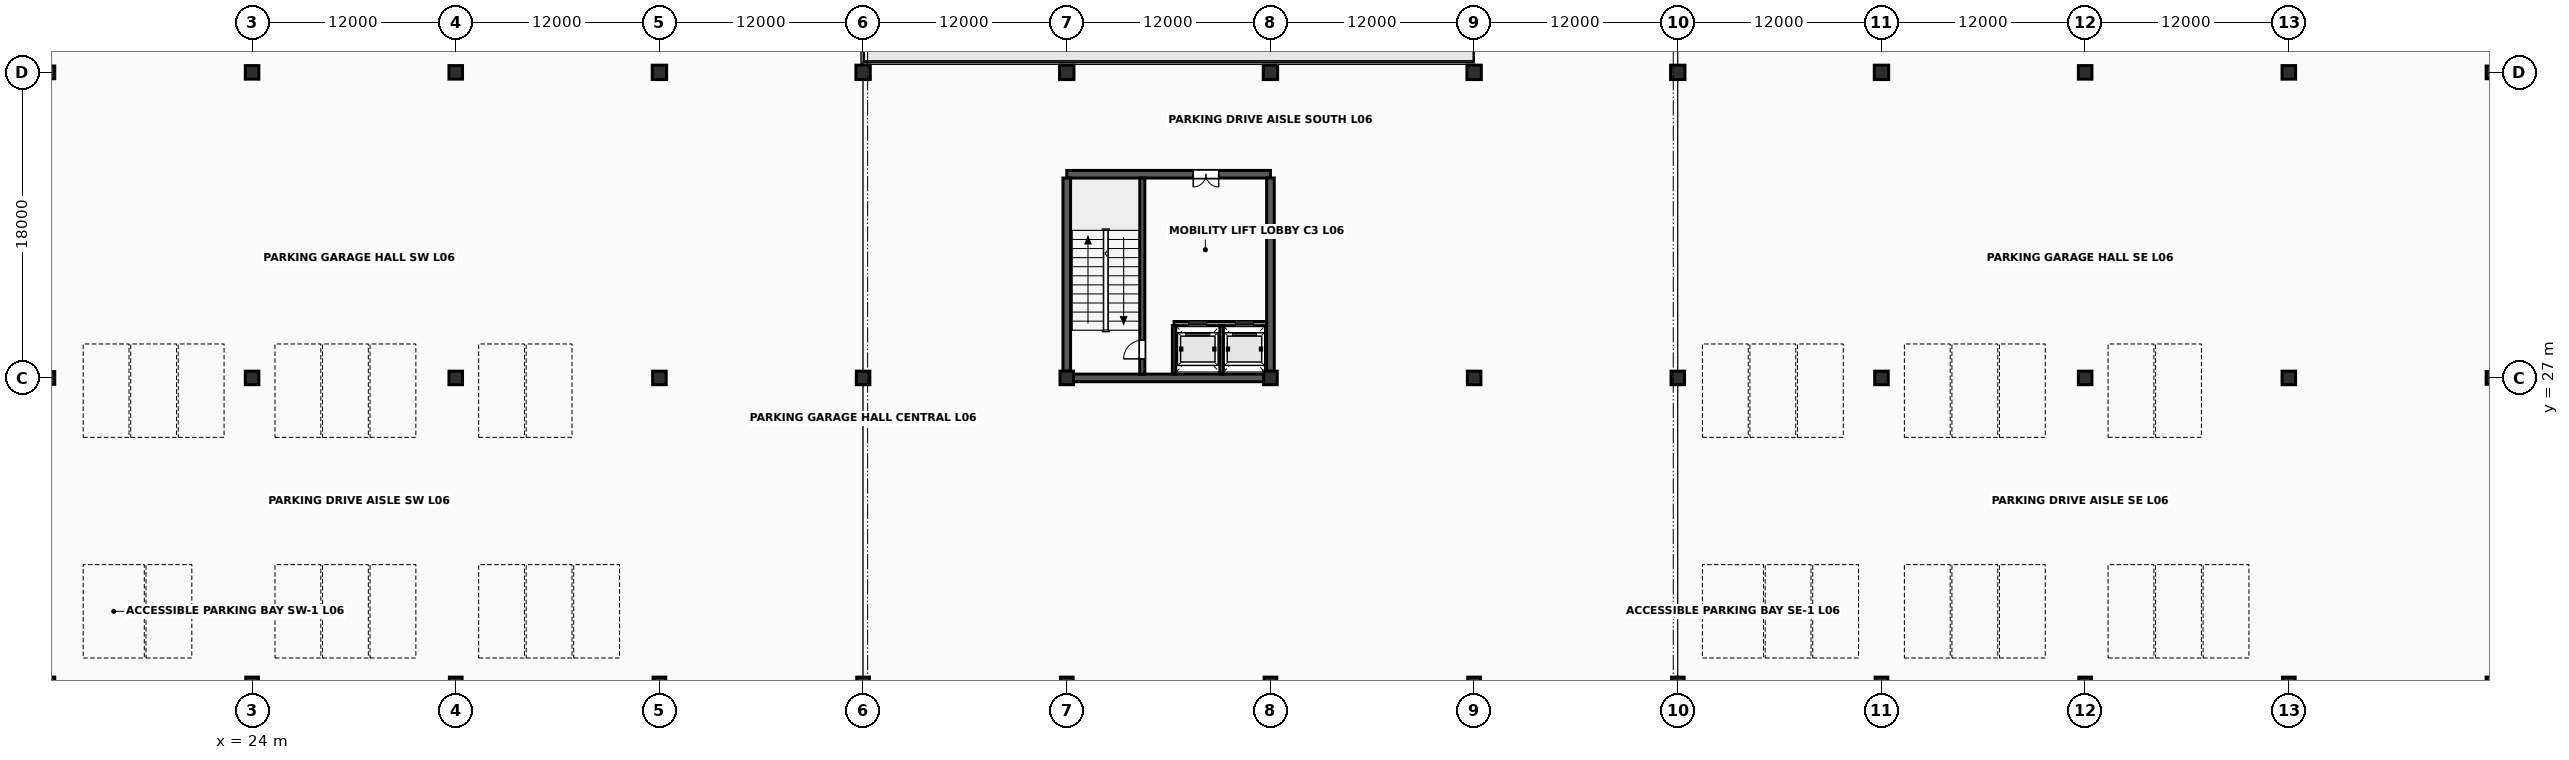
"""IFC4 building model, lengths in metres.
Left out: names, types, materials, properties, quantities, classifications, styles, units other than length and angle.
Written with IfcOpenShell. Run it as: python <this file> out.ifc"""

import sys

from ifc_helpers import new_model, si_unit, direction, frame, frame_2d, origin, origin_2d, place, context, subcontext, project, spatial, rectangle, extrude, element, fill, save


model = new_model("IFC4")
c1 = context("Model", 3, precision=1e-05, world=origin(), true_north=direction((0.0, 1.0)))
c2 = subcontext(c1, "Body", "Model", "MODEL_VIEW")
j1 = project(units=[si_unit("LENGTHUNIT", "METRE"), si_unit("PLANEANGLEUNIT", "RADIAN")], contexts=[c1])
p1 = place(None, origin())
s1 = spatial("IfcSite", under=j1, at=p1, CompositionType="ELEMENT")
p2 = place(p1, origin())
s2 = spatial("IfcBuilding", under=s1, at=p2, CompositionType="ELEMENT")
p3 = place(p2, frame((0.0, 0.0, 24.8)))
s3 = spatial("IfcBuildingStorey", under=s2, at=p3, CompositionType="ELEMENT", Elevation=24.8)
for number, where, z_axis, x_axis in (
    (1, (12.0, 9.0, 0.0), (0.0, 0.0, 1.0), (1.0, 0.0, 0.0)),
    (2, (12.0, 27.0, 0.0), (0.0, 0.0, 1.0), (1.0, 0.0, 0.0)),
    (3, (12.0, 45.0, 0.0), (0.0, 0.0, 1.0), (1.0, 0.0, 0.0)),
    (4, (24.0, 9.0, 0.0), (0.0, 0.0, 1.0), (1.0, 0.0, 0.0)),
):
    element("IfcColumn", number, at=place(p3, frame(where, z_axis=z_axis, x_axis=x_axis)), inside=s3, PredefinedType="COLUMN", context=c2, shape_type="SweptSolid", body=[
        extrude(rectangle(XDim=0.75, YDim=0.75, at=origin_2d()), origin(), (0.0, 0.0, 1.0), 3.8),
    ])
for number, where, z_axis, x_axis in (
    (5, (24.0, 27.0, 0.0), (0.0, 0.0, 1.0), (1.0, 0.0, 0.0)),
    (6, (24.0, 45.0, 0.0), (0.0, 0.0, 1.0), (1.0, 0.0, 0.0)),
):
    element("IfcColumn", number, at=place(p3, frame(where, z_axis=z_axis, x_axis=x_axis)), inside=s3, PredefinedType="COLUMN", context=c2, shape_type="SweptSolid", body=[
        extrude(rectangle(XDim=0.8, YDim=0.8, at=origin_2d()), origin(), (0.0, 0.0, 1.0), 3.8),
    ])
p4 = place(p3, frame((36.0, 9.0, 0.0), z_axis=(0.0, 0.0, 1.0), x_axis=(1.0, 0.0, 0.0)))
e7 = element("IfcColumn", 7, at=p4, inside=s3, PredefinedType="COLUMN", context=c2, shape_type="SweptSolid", body=[
    extrude(rectangle(XDim=0.75, YDim=0.75, at=origin_2d()), origin(), (0.0, 0.0, 1.0), 3.8),
])
for number, where, z_axis, x_axis in (
    (8, (36.0, 27.0, 0.0), (0.0, 0.0, 1.0), (1.0, 0.0, 0.0)),
    (9, (36.0, 45.0, 0.0), (0.0, 0.0, 1.0), (1.0, 0.0, 0.0)),
):
    element("IfcColumn", number, at=place(p3, frame(where, z_axis=z_axis, x_axis=x_axis)), inside=s3, PredefinedType="COLUMN", context=c2, shape_type="SweptSolid", body=[
        extrude(rectangle(XDim=0.8, YDim=0.8, at=origin_2d()), origin(), (0.0, 0.0, 1.0), 3.8),
    ])
p5 = place(p3, frame((48.0, 9.0, 0.0), z_axis=(0.0, 0.0, 1.0), x_axis=(1.0, 0.0, 0.0)))
e10 = element("IfcColumn", 10, at=p5, inside=s3, PredefinedType="COLUMN", context=c2, shape_type="SweptSolid", body=[
    extrude(rectangle(XDim=0.75, YDim=0.75, at=origin_2d()), origin(), (0.0, 0.0, 1.0), 3.8),
])
p6 = place(p3, frame((48.0, 27.0, 0.0), z_axis=(0.0, 0.0, 1.0), x_axis=(1.0, 0.0, 0.0)))
e11 = element("IfcColumn", 11, at=p6, inside=s3, PredefinedType="COLUMN", context=c2, shape_type="SweptSolid", body=[
    extrude(rectangle(XDim=0.8, YDim=0.8, at=origin_2d()), origin(), (0.0, 0.0, 1.0), 3.8),
])
p7 = place(p3, frame((48.0, 45.0, 0.0), z_axis=(0.0, 0.0, 1.0), x_axis=(1.0, 0.0, 0.0)))
e12 = element("IfcColumn", 12, at=p7, inside=s3, PredefinedType="COLUMN", context=c2, shape_type="SweptSolid", body=[
    extrude(rectangle(XDim=0.85, YDim=0.85, at=origin_2d()), origin(), (0.0, 0.0, 1.0), 3.8),
])
p8 = place(p3, frame((60.0, 9.0, 0.0), z_axis=(0.0, 0.0, 1.0), x_axis=(1.0, 0.0, 0.0)))
e13 = element("IfcColumn", 13, at=p8, inside=s3, PredefinedType="COLUMN", context=c2, shape_type="SweptSolid", body=[
    extrude(rectangle(XDim=0.75, YDim=0.75, at=origin_2d()), origin(), (0.0, 0.0, 1.0), 3.8),
])
p9 = place(p3, frame((60.0, 27.0, 0.0), z_axis=(0.0, 0.0, 1.0), x_axis=(1.0, 0.0, 0.0)))
e14 = element("IfcColumn", 14, at=p9, inside=s3, PredefinedType="COLUMN", context=c2, shape_type="SweptSolid", body=[
    extrude(rectangle(XDim=0.8, YDim=0.8, at=origin_2d()), origin(), (0.0, 0.0, 1.0), 3.8),
])
p10 = place(p3, frame((60.0, 45.0, 0.0), z_axis=(0.0, 0.0, 1.0), x_axis=(1.0, 0.0, 0.0)))
e15 = element("IfcColumn", 15, at=p10, inside=s3, PredefinedType="COLUMN", context=c2, shape_type="SweptSolid", body=[
    extrude(rectangle(XDim=0.85, YDim=0.85, at=origin_2d()), origin(), (0.0, 0.0, 1.0), 3.8),
])
p11 = place(p3, frame((72.0, 9.0, 0.0), z_axis=(0.0, 0.0, 1.0), x_axis=(1.0, 0.0, 0.0)))
e16 = element("IfcColumn", 16, at=p11, inside=s3, PredefinedType="COLUMN", context=c2, shape_type="SweptSolid", body=[
    extrude(rectangle(XDim=0.75, YDim=0.75, at=origin_2d()), origin(), (0.0, 0.0, 1.0), 3.8),
])
p12 = place(p3, frame((72.0, 27.0, 0.0), z_axis=(0.0, 0.0, 1.0), x_axis=(1.0, 0.0, 0.0)))
e17 = element("IfcColumn", 17, at=p12, inside=s3, PredefinedType="COLUMN", context=c2, shape_type="SweptSolid", body=[
    extrude(rectangle(XDim=0.8, YDim=0.8, at=origin_2d()), origin(), (0.0, 0.0, 1.0), 3.8),
])
p13 = place(p3, frame((72.0, 45.0, 0.0), z_axis=(0.0, 0.0, 1.0), x_axis=(1.0, 0.0, 0.0)))
e18 = element("IfcColumn", 18, at=p13, inside=s3, PredefinedType="COLUMN", context=c2, shape_type="SweptSolid", body=[
    extrude(rectangle(XDim=0.85, YDim=0.85, at=origin_2d()), origin(), (0.0, 0.0, 1.0), 3.8),
])
p14 = place(p3, frame((84.0, 9.0, 0.0), z_axis=(0.0, 0.0, 1.0), x_axis=(1.0, 0.0, 0.0)))
e19 = element("IfcColumn", 19, at=p14, inside=s3, PredefinedType="COLUMN", context=c2, shape_type="SweptSolid", body=[
    extrude(rectangle(XDim=0.75, YDim=0.75, at=origin_2d()), origin(), (0.0, 0.0, 1.0), 3.8),
])
p15 = place(p3, frame((84.0, 27.0, 0.0), z_axis=(0.0, 0.0, 1.0), x_axis=(1.0, 0.0, 0.0)))
e20 = element("IfcColumn", 20, at=p15, inside=s3, PredefinedType="COLUMN", context=c2, shape_type="SweptSolid", body=[
    extrude(rectangle(XDim=0.8, YDim=0.8, at=origin_2d()), origin(), (0.0, 0.0, 1.0), 3.8),
])
p16 = place(p3, frame((84.0, 45.0, 0.0), z_axis=(0.0, 0.0, 1.0), x_axis=(1.0, 0.0, 0.0)))
e21 = element("IfcColumn", 21, at=p16, inside=s3, PredefinedType="COLUMN", context=c2, shape_type="SweptSolid", body=[
    extrude(rectangle(XDim=0.85, YDim=0.85, at=origin_2d()), origin(), (0.0, 0.0, 1.0), 3.8),
])
p17 = place(p3, frame((96.0, 9.0, 0.0), z_axis=(0.0, 0.0, 1.0), x_axis=(1.0, 0.0, 0.0)))
e22 = element("IfcColumn", 22, at=p17, inside=s3, PredefinedType="COLUMN", context=c2, shape_type="SweptSolid", body=[
    extrude(rectangle(XDim=0.75, YDim=0.75, at=origin_2d()), origin(), (0.0, 0.0, 1.0), 3.8),
])
p18 = place(p3, frame((96.0, 27.0, 0.0), z_axis=(0.0, 0.0, 1.0), x_axis=(1.0, 0.0, 0.0)))
e23 = element("IfcColumn", 23, at=p18, inside=s3, PredefinedType="COLUMN", context=c2, shape_type="SweptSolid", body=[
    extrude(rectangle(XDim=0.8, YDim=0.8, at=origin_2d()), origin(), (0.0, 0.0, 1.0), 3.8),
])
p19 = place(p3, frame((96.0, 45.0, 0.0), z_axis=(0.0, 0.0, 1.0), x_axis=(1.0, 0.0, 0.0)))
e24 = element("IfcColumn", 24, at=p19, inside=s3, PredefinedType="COLUMN", context=c2, shape_type="SweptSolid", body=[
    extrude(rectangle(XDim=0.85, YDim=0.85, at=origin_2d()), origin(), (0.0, 0.0, 1.0), 3.8),
])
p20 = place(p3, frame((108.0, 9.0, 0.0), z_axis=(0.0, 0.0, 1.0), x_axis=(1.0, 0.0, 0.0)))
e25 = element("IfcColumn", 25, at=p20, inside=s3, PredefinedType="COLUMN", context=c2, shape_type="SweptSolid", body=[
    extrude(rectangle(XDim=0.75, YDim=0.75, at=origin_2d()), origin(), (0.0, 0.0, 1.0), 3.8),
])
p21 = place(p3, frame((108.0, 27.0, 0.0), z_axis=(0.0, 0.0, 1.0), x_axis=(1.0, 0.0, 0.0)))
e26 = element("IfcColumn", 26, at=p21, inside=s3, PredefinedType="COLUMN", context=c2, shape_type="SweptSolid", body=[
    extrude(rectangle(XDim=0.8, YDim=0.8, at=origin_2d()), origin(), (0.0, 0.0, 1.0), 3.8),
])
p22 = place(p3, frame((108.0, 45.0, 0.0), z_axis=(0.0, 0.0, 1.0), x_axis=(1.0, 0.0, 0.0)))
e27 = element("IfcColumn", 27, at=p22, inside=s3, PredefinedType="COLUMN", context=c2, shape_type="SweptSolid", body=[
    extrude(rectangle(XDim=0.85, YDim=0.85, at=origin_2d()), origin(), (0.0, 0.0, 1.0), 3.8),
])
p23 = place(p3, frame((120.0, 9.0, 0.0), z_axis=(0.0, 0.0, 1.0), x_axis=(1.0, 0.0, 0.0)))
e28 = element("IfcColumn", 28, at=p23, inside=s3, PredefinedType="COLUMN", context=c2, shape_type="SweptSolid", body=[
    extrude(rectangle(XDim=0.75, YDim=0.75, at=origin_2d()), origin(), (0.0, 0.0, 1.0), 3.8),
])
p24 = place(p3, frame((120.0, 27.0, 0.0), z_axis=(0.0, 0.0, 1.0), x_axis=(1.0, 0.0, 0.0)))
e29 = element("IfcColumn", 29, at=p24, inside=s3, PredefinedType="COLUMN", context=c2, shape_type="SweptSolid", body=[
    extrude(rectangle(XDim=0.8, YDim=0.8, at=origin_2d()), origin(), (0.0, 0.0, 1.0), 3.8),
])
p25 = place(p3, frame((120.0, 45.0, 0.0), z_axis=(0.0, 0.0, 1.0), x_axis=(1.0, 0.0, 0.0)))
e30 = element("IfcColumn", 30, at=p25, inside=s3, PredefinedType="COLUMN", context=c2, shape_type="SweptSolid", body=[
    extrude(rectangle(XDim=0.85, YDim=0.85, at=origin_2d()), origin(), (0.0, 0.0, 1.0), 3.8),
])
p26 = place(p3, frame((132.0, 9.0, 0.0), z_axis=(0.0, 0.0, 1.0), x_axis=(1.0, 0.0, 0.0)))
e31 = element("IfcColumn", 31, at=p26, inside=s3, PredefinedType="COLUMN", context=c2, shape_type="SweptSolid", body=[
    extrude(rectangle(XDim=0.75, YDim=0.75, at=origin_2d()), origin(), (0.0, 0.0, 1.0), 3.8),
])
for number, where, z_axis, x_axis in (
    (32, (132.0, 27.0, 0.0), (0.0, 0.0, 1.0), (1.0, 0.0, 0.0)),
    (33, (132.0, 45.0, 0.0), (0.0, 0.0, 1.0), (1.0, 0.0, 0.0)),
):
    element("IfcColumn", number, at=place(p3, frame(where, z_axis=z_axis, x_axis=x_axis)), inside=s3, PredefinedType="COLUMN", context=c2, shape_type="SweptSolid", body=[
        extrude(rectangle(XDim=0.8, YDim=0.8, at=origin_2d()), origin(), (0.0, 0.0, 1.0), 3.8),
    ])
p27 = place(p3, frame((144.0, 9.0, 0.0), z_axis=(0.0, 0.0, 1.0), x_axis=(1.0, 0.0, 0.0)))
e34 = element("IfcColumn", 34, at=p27, inside=s3, PredefinedType="COLUMN", context=c2, shape_type="SweptSolid", body=[
    extrude(rectangle(XDim=0.75, YDim=0.75, at=origin_2d()), origin(), (0.0, 0.0, 1.0), 3.8),
])
for number, where, z_axis, x_axis in (
    (35, (144.0, 27.0, 0.0), (0.0, 0.0, 1.0), (1.0, 0.0, 0.0)),
    (36, (144.0, 45.0, 0.0), (0.0, 0.0, 1.0), (1.0, 0.0, 0.0)),
):
    element("IfcColumn", number, at=place(p3, frame(where, z_axis=z_axis, x_axis=x_axis)), inside=s3, PredefinedType="COLUMN", context=c2, shape_type="SweptSolid", body=[
        extrude(rectangle(XDim=0.8, YDim=0.8, at=origin_2d()), origin(), (0.0, 0.0, 1.0), 3.8),
    ])
for number, where, z_axis, x_axis in (
    (37, (156.0, 9.0, 0.0), (0.0, 0.0, 1.0), (1.0, 0.0, 0.0)),
    (38, (156.0, 27.0, 0.0), (0.0, 0.0, 1.0), (1.0, 0.0, 0.0)),
    (39, (156.0, 45.0, 0.0), (0.0, 0.0, 1.0), (1.0, 0.0, 0.0)),
):
    element("IfcColumn", number, at=place(p3, frame(where, z_axis=z_axis, x_axis=x_axis)), inside=s3, PredefinedType="COLUMN", context=c2, shape_type="SweptSolid", body=[
        extrude(rectangle(XDim=0.75, YDim=0.75, at=origin_2d()), origin(), (0.0, 0.0, 1.0), 3.8),
    ])
p28 = place(p3, frame((72.397, 27.0, 0.0), z_axis=(0.0, 0.0, 1.0), x_axis=(1.0, 0.0, 0.0)))
e40 = element("IfcWall", 40, at=p28, inside=s3, PredefinedType="SHEAR", context=c2, shape_type="SweptSolid", body=[
    extrude(rectangle(XDim=11.206, YDim=0.45, at=frame_2d((5.603, 0.0))), origin(), (0.0, 0.0, 1.0), 3.628),
])
p29 = place(p3, frame((72.0, 39.0, 0.0), z_axis=(0.0, 0.0, 1.0), x_axis=(1.0, 0.0, 0.0)))
e41 = element("IfcWall", 41, at=p29, inside=s3, PredefinedType="SHEAR", context=c2, shape_type="SweptSolid", body=[
    extrude(rectangle(XDim=12.0, YDim=0.45, at=frame_2d((6.0, 0.0))), origin(), (0.0, 0.0, 1.0), 3.628),
])
p30 = place(p29, frame((7.45, 0.0, 0.0)))
e42 = element("IfcOpeningElement", 42, at=p30, cuts=e41, PredefinedType="OPENING", context=c2, shape_type="SweptSolid", body=[
    extrude(rectangle(XDim=1.5, YDim=2.25, at=frame_2d((0.75, 1.125))), frame((0.0, 0.24, 0.0), z_axis=(0.0, -1.0, 0.0), x_axis=(1.0, 0.0, 0.0)), (0.0, 0.0, 1.0), 0.48),
])
for number, where, z_axis, x_axis in (
    (43, (72.0, 27.397, 0.0), (0.0, 0.0, 1.0), (0.0, 1.0, 0.0)),
    (44, (84.0, 27.397, 0.0), (0.0, 0.0, 1.0), (0.0, 1.0, 0.0)),
):
    element("IfcWall", number, at=place(p3, frame(where, z_axis=z_axis, x_axis=x_axis)), inside=s3, PredefinedType="SHEAR", context=c2, shape_type="SweptSolid", body=[
        extrude(rectangle(XDim=11.381, YDim=0.45, at=frame_2d((5.69, 0.0))), origin(), (0.0, 0.0, 1.0), 3.628),
    ])
p31 = place(p3, frame((76.45, 27.222, 0.0), z_axis=(0.0, 0.0, 1.0), x_axis=(0.0, 1.0, 0.0)))
e45 = element("IfcWall", 45, at=p31, inside=s3, PredefinedType="SHEAR", context=c2, shape_type="SweptSolid", body=[
    extrude(rectangle(XDim=11.556, YDim=0.3, at=frame_2d((5.778, 0.0))), origin(), (0.0, 0.0, 1.0), 3.628),
])
p32 = place(p31, frame((0.9, 0.0, 0.0)))
e46 = element("IfcOpeningElement", 46, at=p32, cuts=e45, PredefinedType="OPENING", context=c2, shape_type="SweptSolid", body=[
    extrude(rectangle(XDim=1.1, YDim=2.2, at=frame_2d((0.55, 1.1))), frame((0.0, 0.165, 0.0), z_axis=(0.0, -1.0, 0.0), x_axis=(1.0, 0.0, 0.0)), (0.0, 0.0, 1.0), 0.33),
])
p33 = place(p3, frame((78.32, 30.2, 0.0), z_axis=(0.0, 0.0, 1.0), x_axis=(1.0, 0.0, 0.0)))
e47 = element("IfcWall", 47, at=p33, inside=s3, PredefinedType="SOLIDWALL", context=c2, shape_type="SweptSolid", body=[
    extrude(rectangle(XDim=5.458, YDim=0.25, at=frame_2d((2.729, 0.0))), origin(), (0.0, 0.0, 1.0), 3.628),
])
p34 = place(p33, frame((0.86, 0.0, 0.0)))
e48 = element("IfcOpeningElement", 48, at=p34, cuts=e47, PredefinedType="OPENING", context=c2, shape_type="SweptSolid", body=[
    extrude(rectangle(XDim=1.08, YDim=2.22, at=frame_2d((0.54, 1.11))), frame((0.0, 0.14, 0.0), z_axis=(0.0, -1.0, 0.0), x_axis=(1.0, 0.0, 0.0)), (0.0, 0.0, 1.0), 0.28),
])
p35 = place(p33, frame((3.61, 0.0, 0.0)))
e49 = element("IfcOpeningElement", 49, at=p35, cuts=e47, PredefinedType="OPENING", context=c2, shape_type="SweptSolid", body=[
    extrude(rectangle(XDim=1.08, YDim=2.22, at=frame_2d((0.54, 1.11))), frame((0.0, 0.14, 0.0), z_axis=(0.0, -1.0, 0.0), x_axis=(1.0, 0.0, 0.0)), (0.0, 0.0, 1.0), 0.28),
])
for number, where, z_axis, x_axis in (
    (50, (78.32, 27.225, 0.0), (0.0, 0.0, 1.0), (0.0, 1.0, 0.0)),
    (51, (81.12, 27.225, 0.0), (0.0, 0.0, 1.0), (0.0, 1.0, 0.0)),
):
    element("IfcWall", number, at=place(p3, frame(where, z_axis=z_axis, x_axis=x_axis)), inside=s3, PredefinedType="SOLIDWALL", context=c2, shape_type="SweptSolid", body=[
        extrude(rectangle(XDim=2.855, YDim=0.2, at=frame_2d((1.427, 0.0))), origin(), (0.0, 0.0, 1.0), 3.618),
    ])
p36 = place(p32, origin())
e52 = element("IfcDoor", 52, at=p36, inside=s3, OperationType="SINGLE_SWING_LEFT", PredefinedType="DOOR", context=c2, shape_type="SweptSolid", body=[
    extrude(rectangle(XDim=1.1, YDim=2.2, at=frame_2d((0.55, 1.1))), frame((0.0, 0.025, 0.0), z_axis=(0.0, -1.0, 0.0), x_axis=(1.0, 0.0, 0.0)), (0.0, 0.0, 1.0), 0.05),
])
fill(e46, e52)
p37 = place(p30, origin())
e53 = element("IfcDoor", 53, at=p37, inside=s3, OperationType="DOUBLE_DOOR_SINGLE_SWING", PredefinedType="DOOR", context=c2, shape_type="SweptSolid", body=[
    extrude(rectangle(XDim=1.5, YDim=2.25, at=frame_2d((0.75, 1.125))), frame((0.0, 0.025, 0.0), z_axis=(0.0, -1.0, 0.0), x_axis=(1.0, 0.0, 0.0)), (0.0, 0.0, 1.0), 0.05),
])
fill(e42, e53)
p38 = place(p34, origin())
e54 = element("IfcDoor", 54, at=p38, inside=s3, OperationType="SLIDING_TO_LEFT", PredefinedType="USERDEFINED", context=c2, shape_type="SweptSolid", body=[
    extrude(rectangle(XDim=1.08, YDim=2.22, at=frame_2d((0.54, 1.11))), frame((0.0, 0.025, 0.0), z_axis=(0.0, -1.0, 0.0), x_axis=(1.0, 0.0, 0.0)), (0.0, 0.0, 1.0), 0.05),
])
fill(e48, e54)
p39 = place(p35, origin())
e55 = element("IfcDoor", 55, at=p39, inside=s3, OperationType="SLIDING_TO_LEFT", PredefinedType="USERDEFINED", context=c2, shape_type="SweptSolid", body=[
    extrude(rectangle(XDim=1.08, YDim=2.22, at=frame_2d((0.54, 1.11))), frame((0.0, 0.025, 0.0), z_axis=(0.0, -1.0, 0.0), x_axis=(1.0, 0.0, 0.0)), (0.0, 0.0, 1.0), 0.05),
])
fill(e49, e55)
save(model, sys.argv[1])
